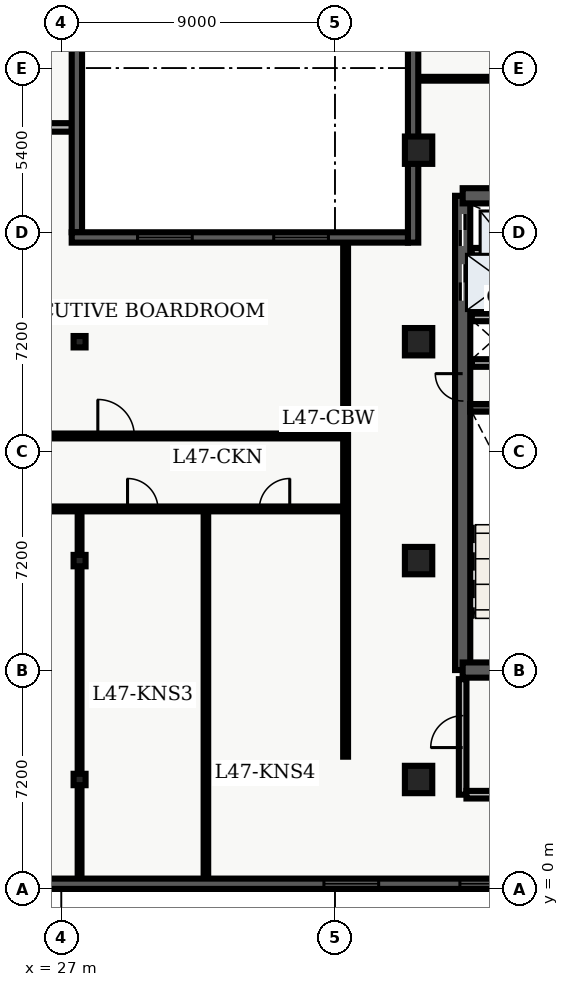
"""IFC4 building model, lengths in metres.
Left out: names, types, materials, properties, quantities, classifications, styles, units other than length and angle.
Written with IfcOpenShell. Run it as: python <this file> out.ifc"""

import sys

from ifc_helpers import new_model, entity, si_unit, converted_unit, direction, frame, origin_with_axes, origin_2d_with_axis, place, context, subcontext, project, spatial, polyline, rectangle, i_section, outline, extrude, element, fill, save


model = new_model("IFC4")
c1 = context("Model", 3, precision=1e-05, world=origin_with_axes(), true_north=direction((0.0, 1.0)))
c2 = subcontext(c1, "Body", "Model", "MODEL_VIEW")
j1 = project(units=[si_unit("LENGTHUNIT", "METRE"), converted_unit("PLANEANGLEUNIT", "DEGREE", entity("IfcPlaneAngleMeasure", 0.017), si_unit("PLANEANGLEUNIT", "RADIAN"), dimensions=[0, 0, 0, 0, 0, 0, 0])], contexts=[c1])
p1 = place(None, origin_with_axes())
s1 = spatial("IfcSite", under=j1, at=p1, CompositionType="ELEMENT")
p2 = place(p1, origin_with_axes())
s2 = spatial("IfcBuilding", under=s1, at=p2, CompositionType="ELEMENT")
p3 = place(p2, frame((0.0, 0.0, 192.6), z_axis=(0.0, 0.0, 1.0), x_axis=(1.0, 0.0, 0.0)))
s3 = spatial("IfcBuildingStorey", under=s2, at=p3, CompositionType="ELEMENT", Elevation=192.6)
p4 = place(p3, frame((40.2, 7.2, 0.0), z_axis=(0.0, 0.0, 1.0), x_axis=(0.0, 1.0, 0.0)))
e1 = element("IfcWall", 1, at=p4, inside=s3, PredefinedType="SHEAR", context=c2, shape_type="SweptSolid", body=[
    extrude(outline(polyline([(0.0, -0.25), (15.6, -0.25), (15.6, 0.25), (0.0, 0.25), (0.0, -0.25)])), origin_with_axes(), (0.0, 0.0, 1.0), 3.66),
])
p5 = place(p4, frame((14.475, 0.0, 0.0), z_axis=(0.0, 0.0, 1.0), x_axis=(1.0, 0.0, 0.0)))
e2 = element("IfcOpeningElement", 2, at=p5, cuts=e1, PredefinedType="OPENING", context=c2, shape_type="SweptSolid", body=[
    extrude(rectangle(XDim=1.05, YDim=0.52, at=origin_2d_with_axis()), origin_with_axes(), (0.0, 0.0, 1.0), 2.15),
])
p6 = place(p4, frame((12.75, 0.0, 0.0), z_axis=(0.0, 0.0, 1.0), x_axis=(1.0, 0.0, 0.0)))
e3 = element("IfcOpeningElement", 3, at=p6, cuts=e1, PredefinedType="OPENING", context=c2, shape_type="SweptSolid", body=[
    extrude(rectangle(XDim=1.2, YDim=0.52, at=origin_2d_with_axis()), origin_with_axes(), (0.0, 0.0, 1.0), 2.15),
])
p7 = place(p4, frame((9.3, 0.0, 0.0), z_axis=(0.0, 0.0, 1.0), x_axis=(1.0, 0.0, 0.0)))
e4 = element("IfcOpeningElement", 4, at=p7, cuts=e1, PredefinedType="OPENING", context=c2, shape_type="SweptSolid", body=[
    extrude(rectangle(XDim=0.9, YDim=0.52, at=origin_2d_with_axis()), origin_with_axes(), (0.0, 0.0, 1.0), 2.15),
])
p8 = place(p3, frame((40.2, 7.2, 0.0), z_axis=(0.0, 0.0, 1.0), x_axis=(1.0, 0.0, 0.0)))
e5 = element("IfcWall", 5, at=p8, inside=s3, PredefinedType="SHEAR", context=c2, shape_type="SweptSolid", body=[
    extrude(outline(polyline([(0.0, -0.25), (7.85, -0.25), (7.85, 0.25), (0.0, 0.25), (0.0, -0.25)])), origin_with_axes(), (0.0, 0.0, 1.0), 3.66),
])
p9 = place(p8, frame((2.175, 0.0, 0.0), z_axis=(0.0, 0.0, 1.0), x_axis=(1.0, 0.0, 0.0)))
e6 = element("IfcOpeningElement", 6, at=p9, cuts=e5, PredefinedType="OPENING", context=c2, shape_type="SweptSolid", body=[
    extrude(rectangle(XDim=1.05, YDim=0.52, at=origin_2d_with_axis()), origin_with_axes(), (0.0, 0.0, 1.0), 2.15),
])
p10 = place(p3, frame((40.2, 22.8, 0.0), z_axis=(0.0, 0.0, 1.0), x_axis=(1.0, 0.0, 0.0)))
e7 = element("IfcWall", 7, at=p10, inside=s3, PredefinedType="SHEAR", context=c2, shape_type="SweptSolid", body=[
    extrude(outline(polyline([(0.0, -0.25), (7.85, -0.25), (7.85, 0.25), (0.0, 0.25), (0.0, -0.25)])), origin_with_axes(), (0.0, 0.0, 1.0), 3.66),
])
p11 = place(p10, frame((5.775, 0.0, 0.0), z_axis=(0.0, 0.0, 1.0), x_axis=(1.0, 0.0, 0.0)))
e8 = element("IfcOpeningElement", 8, at=p11, cuts=e7, PredefinedType="OPENING", context=c2, shape_type="SweptSolid", body=[
    extrude(rectangle(XDim=1.05, YDim=0.52, at=origin_2d_with_axis()), origin_with_axes(), (0.0, 0.0, 1.0), 2.15),
])
p12 = place(p3, frame((40.45, 15.825, 0.0), z_axis=(0.0, 0.0, 1.0), x_axis=(1.0, 0.0, 0.0)))
e9 = element("IfcWall", 9, at=p12, inside=s3, PredefinedType="SHEAR", context=c2, shape_type="SweptSolid", body=[
    extrude(outline(polyline([(0.0, -0.125), (3.55, -0.125), (3.55, 0.125), (0.0, 0.125), (0.0, -0.125)])), origin_with_axes(), (0.0, 0.0, 1.0), 3.66),
])
p13 = place(p3, frame((40.5, 17.3, 0.0), z_axis=(0.0, 0.0, 1.0), x_axis=(1.0, 0.0, 0.0)))
e10 = element("IfcWall", 10, at=p13, inside=s3, PredefinedType="SOLIDWALL", context=c2, shape_type="SweptSolid", body=[
    extrude(outline(polyline([(0.0, -0.125), (3.5, -0.125), (3.5, 0.125), (0.0, 0.125), (0.0, -0.125)])), origin_with_axes(), (0.0, 0.0, 1.0), 2.7),
])
p14 = place(p13, frame((2.4, 0.0, 0.0), z_axis=(0.0, 0.0, 1.0), x_axis=(1.0, 0.0, 0.0)))
e11 = element("IfcOpeningElement", 11, at=p14, cuts=e10, PredefinedType="OPENING", context=c2, shape_type="SweptSolid", body=[
    extrude(rectangle(XDim=0.9, YDim=0.27, at=origin_2d_with_axis()), origin_with_axes(), (0.0, 0.0, 1.0), 2.15),
])
p15 = place(p3, frame((40.5, 18.8, 0.0), z_axis=(0.0, 0.0, 1.0), x_axis=(1.0, 0.0, 0.0)))
e12 = element("IfcWall", 12, at=p15, inside=s3, PredefinedType="SOLIDWALL", context=c2, shape_type="SweptSolid", body=[
    extrude(outline(polyline([(0.0, -0.125), (3.5, -0.125), (3.5, 0.125), (0.0, 0.125), (0.0, -0.125)])), origin_with_axes(), (0.0, 0.0, 1.0), 2.7),
])
p16 = place(p3, frame((40.2, 3.1, 0.0), z_axis=(0.0, 0.0, 1.0), x_axis=(0.0, 1.0, 0.0)))
e13 = element("IfcWall", 13, at=p16, inside=s3, PredefinedType="SOLIDWALL", context=c2, shape_type="SweptSolid", body=[
    extrude(outline(polyline([(0.0, -0.125), (3.8, -0.125), (3.8, 0.125), (0.0, 0.125), (0.0, -0.125)])), origin_with_axes(), (0.0, 0.0, 1.0), 2.7),
])
p17 = place(p16, frame((2.075, 0.0, 0.0), z_axis=(0.0, 0.0, 1.0), x_axis=(1.0, 0.0, 0.0)))
e14 = element("IfcOpeningElement", 14, at=p17, cuts=e13, PredefinedType="OPENING", context=c2, shape_type="SweptSolid", body=[
    extrude(rectangle(XDim=1.05, YDim=0.27, at=origin_2d_with_axis()), origin_with_axes(), (0.0, 0.0, 1.0), 2.15),
])
p18 = place(p3, frame((40.325, 3.1, 0.0), z_axis=(0.0, 0.0, 1.0), x_axis=(1.0, 0.0, 0.0)))
e15 = element("IfcWall", 15, at=p18, inside=s3, PredefinedType="SOLIDWALL", context=c2, shape_type="SweptSolid", body=[
    extrude(outline(polyline([(0.0, -0.125), (3.95, -0.125), (3.95, 0.125), (0.0, 0.125), (0.0, -0.125)])), origin_with_axes(), (0.0, 0.0, 1.0), 2.7),
])
for number, where, z_axis, x_axis in (
    (16, (27.6, 3.6, 0.0), (0.0, 0.0, 1.0), (1.0, 0.0, 0.0)),
    (17, (27.6, 10.8, 0.0), (0.0, 0.0, 1.0), (1.0, 0.0, 0.0)),
    (18, (27.6, 18.0, 0.0), (0.0, 0.0, 1.0), (1.0, 0.0, 0.0)),
):
    element("IfcColumn", number, at=place(p3, frame(where, z_axis=z_axis, x_axis=x_axis)), inside=s3, PredefinedType="COLUMN", context=c2, shape_type="SweptSolid", body=[
        extrude(i_section(OverallWidth=0.394, OverallDepth=0.375, WebThickness=0.017, FlangeThickness=0.028, FilletRadius=0.02, at=origin_2d_with_axis()), origin_with_axes(), (0.0, 0.0, 1.0), 3.9),
    ])
for number, where, z_axis, x_axis in (
    (19, (38.75, 3.6, 0.0), (0.0, 0.0, 1.0), (1.0, 0.0, 0.0)),
    (20, (38.75, 10.8, 0.0), (0.0, 0.0, 1.0), (1.0, 0.0, 0.0)),
    (21, (38.75, 18.0, 0.0), (0.0, 0.0, 1.0), (1.0, 0.0, 0.0)),
    (22, (38.75, 24.3, 0.0), (0.0, 0.0, 1.0), (1.0, 0.0, 0.0)),
):
    element("IfcColumn", number, at=place(p3, frame(where, z_axis=z_axis, x_axis=x_axis)), inside=s3, PredefinedType="COLUMN", context=c2, shape_type="SweptSolid", body=[
        extrude(rectangle(XDim=0.9, YDim=0.9, at=origin_2d_with_axis()), origin_with_axes(), (0.0, 0.0, 1.0), 3.9),
    ])
p19 = place(p3, frame((40.5, 20.96, 0.0), z_axis=(0.0, 0.0, 1.0), x_axis=(1.0, 0.0, 0.0)))
e23 = element("IfcWall", 23, at=p19, inside=s3, PredefinedType="SOLIDWALL", context=c2, shape_type="SweptSolid", body=[
    extrude(outline(polyline([(0.0, -0.125), (3.5, -0.125), (3.5, 0.125), (0.0, 0.125), (0.0, -0.125)])), origin_with_axes(), (0.0, 0.0, 1.0), 2.7),
])
p20 = place(p3, frame((21.3, 25.049, 0.0), z_axis=(0.0, 0.0, 1.0), x_axis=(1.0, 0.0, 0.0)))
e24 = element("IfcWall", 24, at=p20, inside=s3, PredefinedType="PARTITIONING", context=c2, shape_type="SweptSolid", body=[
    extrude(outline(polyline([(0.0, -0.14), (6.046, -0.14), (6.046, 0.14), (0.0, 0.14), (0.0, -0.14)])), origin_with_axes(), (0.0, 0.0, 1.0), 2.7),
])
p21 = place(p3, frame((21.15, 12.5, 0.0), z_axis=(0.0, 0.0, 1.0), x_axis=(1.0, 0.0, 0.0)))
e25 = element("IfcWall", 25, at=p21, inside=s3, PredefinedType="PARTITIONING", context=c2, shape_type="SweptSolid", body=[
    extrude(outline(polyline([(0.0, -0.08), (15.2, -0.08), (15.2, 0.08), (0.0, 0.08), (0.0, -0.08)])), origin_with_axes(), (0.0, 0.0, 1.0), 2.7),
])
p22 = place(p21, frame((1.762, 0.0, 0.0), z_axis=(0.0, 0.0, 1.0), x_axis=(1.0, 0.0, 0.0)))
e26 = element("IfcOpeningElement", 26, at=p22, cuts=e25, PredefinedType="OPENING", context=c2, shape_type="SweptSolid", body=[
    extrude(rectangle(XDim=1.0, YDim=0.18, at=origin_2d_with_axis()), origin_with_axes(), (0.0, 0.0, 1.0), 2.15),
])
p23 = place(p21, frame((4.897, 0.0, 0.0), z_axis=(0.0, 0.0, 1.0), x_axis=(1.0, 0.0, 0.0)))
e27 = element("IfcOpeningElement", 27, at=p23, cuts=e25, PredefinedType="OPENING", context=c2, shape_type="SweptSolid", body=[
    extrude(rectangle(XDim=1.0, YDim=0.18, at=origin_2d_with_axis()), origin_with_axes(), (0.0, 0.0, 1.0), 2.15),
])
p24 = place(p21, frame((8.527, 0.0, 0.0), z_axis=(0.0, 0.0, 1.0), x_axis=(1.0, 0.0, 0.0)))
e28 = element("IfcOpeningElement", 28, at=p24, cuts=e25, PredefinedType="OPENING", context=c2, shape_type="SweptSolid", body=[
    extrude(rectangle(XDim=1.0, YDim=0.18, at=origin_2d_with_axis()), origin_with_axes(), (0.0, 0.0, 1.0), 2.15),
])
p25 = place(p21, frame((12.863, 0.0, 0.0), z_axis=(0.0, 0.0, 1.0), x_axis=(1.0, 0.0, 0.0)))
e29 = element("IfcOpeningElement", 29, at=p25, cuts=e25, PredefinedType="OPENING", context=c2, shape_type="SweptSolid", body=[
    extrude(rectangle(XDim=1.0, YDim=0.18, at=origin_2d_with_axis()), origin_with_axes(), (0.0, 0.0, 1.0), 2.15),
])
p26 = place(p3, frame((21.15, 14.9, 0.0), z_axis=(0.0, 0.0, 1.0), x_axis=(1.0, 0.0, 0.0)))
e30 = element("IfcWall", 30, at=p26, inside=s3, PredefinedType="PARTITIONING", context=c2, shape_type="SweptSolid", body=[
    extrude(outline(polyline([(0.0, -0.08), (15.2, -0.08), (15.2, 0.08), (0.0, 0.08), (0.0, -0.08)])), origin_with_axes(), (0.0, 0.0, 1.0), 2.7),
])
p27 = place(p26, frame((7.65, 0.0, 0.0), z_axis=(0.0, 0.0, 1.0), x_axis=(1.0, 0.0, 0.0)))
e31 = element("IfcOpeningElement", 31, at=p27, cuts=e30, PredefinedType="OPENING", context=c2, shape_type="SweptSolid", body=[
    extrude(rectangle(XDim=1.2, YDim=0.18, at=origin_2d_with_axis()), origin_with_axes(), (0.0, 0.0, 1.0), 2.2),
])
p28 = place(p3, frame((36.35, 4.35, 0.0), z_axis=(0.0, 0.0, 1.0), x_axis=(0.0, 1.0, 0.0)))
e32 = element("IfcWall", 32, at=p28, inside=s3, PredefinedType="PARTITIONING", context=c2, shape_type="SweptSolid", body=[
    extrude(outline(polyline([(0.0, -0.08), (16.95, -0.08), (16.95, 0.08), (0.0, 0.08), (0.0, -0.08)])), origin_with_axes(), (0.0, 0.0, 1.0), 2.7),
])
p29 = place(p3, frame((27.6, 0.335, 0.0), z_axis=(0.0, 0.0, 1.0), x_axis=(0.0, 1.0, 0.0)))
e33 = element("IfcWall", 33, at=p29, inside=s3, PredefinedType="PARTITIONING", context=c2, shape_type="SweptSolid", body=[
    extrude(outline(polyline([(0.0, -0.062), (12.045, -0.062), (12.045, 0.062), (0.0, 0.062), (0.0, -0.062)])), origin_with_axes(), (0.0, 0.0, 1.0), 2.7),
])
p30 = place(p3, frame((31.755, 0.335, 0.0), z_axis=(0.0, 0.0, 1.0), x_axis=(0.0, 1.0, 0.0)))
e34 = element("IfcWall", 34, at=p30, inside=s3, PredefinedType="PARTITIONING", context=c2, shape_type="SweptSolid", body=[
    extrude(outline(polyline([(0.0, -0.075), (12.045, -0.075), (12.045, 0.075), (0.0, 0.075), (0.0, -0.075)])), origin_with_axes(), (0.0, 0.0, 1.0), 2.7),
])
p31 = place(p3, frame((38.735, 26.65, 0.0), z_axis=(0.0, 0.0, 1.0), x_axis=(1.0, 0.0, 0.0)))
e35 = element("IfcWall", 35, at=p31, inside=s3, PredefinedType="PARTITIONING", context=c2, shape_type="SweptSolid", body=[
    extrude(outline(polyline([(0.0, -0.062), (20.905, -0.062), (20.905, 0.062), (0.0, 0.062), (0.0, -0.062)])), origin_with_axes(), (0.0, 0.0, 1.0), 2.7),
])
p32 = place(p31, frame((4.265, 0.0, 0.0), z_axis=(0.0, 0.0, 1.0), x_axis=(1.0, 0.0, 0.0)))
e36 = element("IfcOpeningElement", 36, at=p32, cuts=e35, PredefinedType="OPENING", context=c2, shape_type="SweptSolid", body=[
    extrude(rectangle(XDim=1.0, YDim=0.145, at=origin_2d_with_axis()), origin_with_axes(), (0.0, 0.0, 1.0), 2.15),
])
p33 = place(p3, frame((38.57, 21.26, 0.0), z_axis=(0.0, 0.0, 1.0), x_axis=(0.0, 1.0, 0.0)))
e37 = element("IfcWall", 37, at=p33, inside=s3, PredefinedType="SOLIDWALL", context=c2, shape_type="SweptSolid", body=[
    extrude(outline(polyline([(0.0, -0.17), (7.54, -0.17), (7.54, 0.17), (0.0, 0.17), (0.0, -0.17)])), origin_with_axes(), (0.0, 0.0, 1.0), 3.66),
])
p34 = place(p3, frame((57.26, 0.17, 0.0), z_axis=(0.0, 0.0, 1.0), x_axis=(-1.0, 0.0, 0.0)))
e38 = element("IfcWall", 38, at=p34, inside=s3, PredefinedType="SOLIDWALL", context=c2, shape_type="SweptSolid", body=[
    extrude(outline(polyline([(0.0, -0.17), (54.86, -0.17), (54.86, 0.17), (0.0, 0.17), (0.0, -0.17)])), origin_with_axes(), (0.0, 0.0, 1.0), 3.66),
])
p35 = place(p34, frame((2.836, 0.0, 0.45), z_axis=(0.0, 0.0, 1.0), x_axis=(1.0, 0.0, 0.0)))
e39 = element("IfcOpeningElement", 39, at=p35, cuts=e38, PredefinedType="OPENING", context=c2, shape_type="SweptSolid", body=[
    extrude(rectangle(XDim=1.8, YDim=0.36, at=origin_2d_with_axis()), origin_with_axes(), (0.0, 0.0, 1.0), 2.1),
])
p36 = place(p34, frame((7.307, 0.0, 0.45), z_axis=(0.0, 0.0, 1.0), x_axis=(1.0, 0.0, 0.0)))
e40 = element("IfcOpeningElement", 40, at=p36, cuts=e38, PredefinedType="OPENING", context=c2, shape_type="SweptSolid", body=[
    extrude(rectangle(XDim=1.8, YDim=0.36, at=origin_2d_with_axis()), origin_with_axes(), (0.0, 0.0, 1.0), 2.1),
])
p37 = place(p34, frame((11.779, 0.0, 0.45), z_axis=(0.0, 0.0, 1.0), x_axis=(1.0, 0.0, 0.0)))
e41 = element("IfcOpeningElement", 41, at=p37, cuts=e38, PredefinedType="OPENING", context=c2, shape_type="SweptSolid", body=[
    extrude(rectangle(XDim=1.8, YDim=0.36, at=origin_2d_with_axis()), origin_with_axes(), (0.0, 0.0, 1.0), 2.1),
])
p38 = place(p34, frame((16.251, 0.0, 0.45), z_axis=(0.0, 0.0, 1.0), x_axis=(1.0, 0.0, 0.0)))
e42 = element("IfcOpeningElement", 42, at=p38, cuts=e38, PredefinedType="OPENING", context=c2, shape_type="SweptSolid", body=[
    extrude(rectangle(XDim=1.8, YDim=0.36, at=origin_2d_with_axis()), origin_with_axes(), (0.0, 0.0, 1.0), 2.1),
])
p39 = place(p34, frame((20.723, 0.0, 0.45), z_axis=(0.0, 0.0, 1.0), x_axis=(1.0, 0.0, 0.0)))
e43 = element("IfcOpeningElement", 43, at=p39, cuts=e38, PredefinedType="OPENING", context=c2, shape_type="SweptSolid", body=[
    extrude(rectangle(XDim=1.8, YDim=0.36, at=origin_2d_with_axis()), origin_with_axes(), (0.0, 0.0, 1.0), 2.1),
])
p40 = place(p34, frame((34.588, 0.0, 0.45), z_axis=(0.0, 0.0, 1.0), x_axis=(1.0, 0.0, 0.0)))
e44 = element("IfcOpeningElement", 44, at=p40, cuts=e38, PredefinedType="OPENING", context=c2, shape_type="SweptSolid", body=[
    extrude(rectangle(XDim=1.8, YDim=0.36, at=origin_2d_with_axis()), origin_with_axes(), (0.0, 0.0, 1.0), 2.1),
])
p41 = place(p34, frame((38.609, 0.0, 0.45), z_axis=(0.0, 0.0, 1.0), x_axis=(1.0, 0.0, 0.0)))
e45 = element("IfcOpeningElement", 45, at=p41, cuts=e38, PredefinedType="OPENING", context=c2, shape_type="SweptSolid", body=[
    extrude(rectangle(XDim=1.8, YDim=0.36, at=origin_2d_with_axis()), origin_with_axes(), (0.0, 0.0, 1.0), 2.1),
])
p42 = place(p34, frame((43.081, 0.0, 0.45), z_axis=(0.0, 0.0, 1.0), x_axis=(1.0, 0.0, 0.0)))
e46 = element("IfcOpeningElement", 46, at=p42, cuts=e38, PredefinedType="OPENING", context=c2, shape_type="SweptSolid", body=[
    extrude(rectangle(XDim=1.8, YDim=0.36, at=origin_2d_with_axis()), origin_with_axes(), (0.0, 0.0, 1.0), 2.1),
])
p43 = place(p34, frame((48.003, 0.0, 0.45), z_axis=(0.0, 0.0, 1.0), x_axis=(1.0, 0.0, 0.0)))
e47 = element("IfcOpeningElement", 47, at=p43, cuts=e38, PredefinedType="OPENING", context=c2, shape_type="SweptSolid", body=[
    extrude(rectangle(XDim=1.8, YDim=0.36, at=origin_2d_with_axis()), origin_with_axes(), (0.0, 0.0, 1.0), 2.1),
])
p44 = place(p34, frame((52.024, 0.0, 0.45), z_axis=(0.0, 0.0, 1.0), x_axis=(1.0, 0.0, 0.0)))
e48 = element("IfcOpeningElement", 48, at=p44, cuts=e38, PredefinedType="OPENING", context=c2, shape_type="SweptSolid", body=[
    extrude(rectangle(XDim=1.8, YDim=0.36, at=origin_2d_with_axis()), origin_with_axes(), (0.0, 0.0, 1.0), 2.1),
])
p45 = place(p3, frame((27.511, 42.42, 0.0), z_axis=(0.0, 0.0, 1.0), x_axis=(0.0, -1.0, 0.0)))
e49 = element("IfcWall", 49, at=p45, inside=s3, PredefinedType="SOLIDWALL", context=c2, shape_type="SweptSolid", body=[
    extrude(outline(polyline([(0.0, -0.17), (20.82, -0.17), (20.82, 0.17), (0.0, 0.17), (0.0, -0.17)])), origin_with_axes(), (0.0, 0.0, 1.0), 3.66),
])
p46 = place(p45, frame((3.503, 0.0, 0.45), z_axis=(0.0, 0.0, 1.0), x_axis=(1.0, 0.0, 0.0)))
e50 = element("IfcOpeningElement", 50, at=p46, cuts=e49, PredefinedType="OPENING", context=c2, shape_type="SweptSolid", body=[
    extrude(rectangle(XDim=1.6, YDim=0.36, at=origin_2d_with_axis()), origin_with_axes(), (0.0, 0.0, 1.0), 2.2),
])
p47 = place(p45, frame((7.957, 0.0, 0.45), z_axis=(0.0, 0.0, 1.0), x_axis=(1.0, 0.0, 0.0)))
e51 = element("IfcOpeningElement", 51, at=p47, cuts=e49, PredefinedType="OPENING", context=c2, shape_type="SweptSolid", body=[
    extrude(rectangle(XDim=1.6, YDim=0.36, at=origin_2d_with_axis()), origin_with_axes(), (0.0, 0.0, 1.0), 2.2),
])
p48 = place(p45, frame((12.412, 0.0, 0.45), z_axis=(0.0, 0.0, 1.0), x_axis=(1.0, 0.0, 0.0)))
e52 = element("IfcOpeningElement", 52, at=p48, cuts=e49, PredefinedType="OPENING", context=c2, shape_type="SweptSolid", body=[
    extrude(rectangle(XDim=1.6, YDim=0.36, at=origin_2d_with_axis()), origin_with_axes(), (0.0, 0.0, 1.0), 2.2),
])
p49 = place(p3, frame((27.341, 21.43, 0.0), z_axis=(0.0, 0.0, 1.0), x_axis=(1.0, 0.0, 0.0)))
e53 = element("IfcWall", 53, at=p49, inside=s3, PredefinedType="SOLIDWALL", context=c2, shape_type="SweptSolid", body=[
    extrude(outline(polyline([(0.0, -0.17), (11.059, -0.17), (11.059, 0.17), (0.0, 0.17), (0.0, -0.17)])), origin_with_axes(), (0.0, 0.0, 1.0), 3.66),
])
p50 = place(p49, frame((3.065, 0.0, 0.45), z_axis=(0.0, 0.0, 1.0), x_axis=(1.0, 0.0, 0.0)))
e54 = element("IfcOpeningElement", 54, at=p50, cuts=e53, PredefinedType="OPENING", context=c2, shape_type="SweptSolid", body=[
    extrude(rectangle(XDim=1.8, YDim=0.36, at=origin_2d_with_axis()), origin_with_axes(), (0.0, 0.0, 1.0), 2.1),
])
p51 = place(p49, frame((7.544, 0.0, 0.45), z_axis=(0.0, 0.0, 1.0), x_axis=(1.0, 0.0, 0.0)))
e55 = element("IfcOpeningElement", 55, at=p51, cuts=e53, PredefinedType="OPENING", context=c2, shape_type="SweptSolid", body=[
    extrude(rectangle(XDim=1.8, YDim=0.36, at=origin_2d_with_axis()), origin_with_axes(), (0.0, 0.0, 1.0), 2.1),
])
p52 = place(p4, frame((14.475, 0.0, 0.0), z_axis=(0.0, 0.0, 1.0), x_axis=(1.0, 0.0, 0.0)))
e56 = element("IfcDoor", 56, at=p52, inside=s3, OperationType="SLIDING_TO_RIGHT", PredefinedType="DOOR", context=c2, shape_type="SweptSolid", body=[
    extrude(rectangle(XDim=1.05, YDim=0.09, at=origin_2d_with_axis()), origin_with_axes(), (0.0, 0.0, 1.0), 2.15),
])
fill(e2, e56)
p53 = place(p4, frame((12.75, 0.0, 0.0), z_axis=(0.0, 0.0, 1.0), x_axis=(1.0, 0.0, 0.0)))
e57 = element("IfcDoor", 57, at=p53, inside=s3, OperationType="DOUBLE_DOOR_SLIDING", PredefinedType="DOOR", context=c2, shape_type="SweptSolid", body=[
    extrude(rectangle(XDim=1.2, YDim=0.09, at=origin_2d_with_axis()), origin_with_axes(), (0.0, 0.0, 1.0), 2.15),
])
fill(e3, e57)
p54 = place(p4, frame((9.3, 0.0, 0.0), z_axis=(0.0, 0.0, 1.0), x_axis=(1.0, 0.0, 0.0)))
e58 = element("IfcDoor", 58, at=p54, inside=s3, OperationType="SINGLE_SWING_RIGHT", PredefinedType="DOOR", context=c2, shape_type="SweptSolid", body=[
    extrude(rectangle(XDim=0.9, YDim=0.09, at=origin_2d_with_axis()), origin_with_axes(), (0.0, 0.0, 1.0), 2.15),
])
fill(e4, e58)
p55 = place(p16, frame((2.075, 0.0, 0.0), z_axis=(0.0, 0.0, 1.0), x_axis=(1.0, 0.0, 0.0)))
e59 = element("IfcDoor", 59, at=p55, inside=s3, OperationType="SINGLE_SWING_LEFT", PredefinedType="DOOR", context=c2, shape_type="SweptSolid", body=[
    extrude(rectangle(XDim=1.05, YDim=0.09, at=origin_2d_with_axis()), origin_with_axes(), (0.0, 0.0, 1.0), 2.15),
])
fill(e14, e59)
p56 = place(p21, frame((8.527, 0.0, 0.0), z_axis=(0.0, 0.0, 1.0), x_axis=(1.0, 0.0, 0.0)))
e60 = element("IfcDoor", 60, at=p56, inside=s3, OperationType="SINGLE_SWING_LEFT", PredefinedType="DOOR", context=c2, shape_type="SweptSolid", body=[
    extrude(rectangle(XDim=1.0, YDim=0.09, at=origin_2d_with_axis()), origin_with_axes(), (0.0, 0.0, 1.0), 2.15),
])
fill(e28, e60)
p57 = place(p21, frame((12.863, 0.0, 0.0), z_axis=(0.0, 0.0, 1.0), x_axis=(1.0, 0.0, 0.0)))
e61 = element("IfcDoor", 61, at=p57, inside=s3, OperationType="SINGLE_SWING_RIGHT", PredefinedType="DOOR", context=c2, shape_type="SweptSolid", body=[
    extrude(rectangle(XDim=1.0, YDim=0.09, at=origin_2d_with_axis()), origin_with_axes(), (0.0, 0.0, 1.0), 2.15),
])
fill(e29, e61)
p58 = place(p26, frame((7.65, 0.0, 0.0), z_axis=(0.0, 0.0, 1.0), x_axis=(1.0, 0.0, 0.0)))
e62 = element("IfcDoor", 62, at=p58, inside=s3, OperationType="SINGLE_SWING_LEFT", PredefinedType="DOOR", context=c2, shape_type="SweptSolid", body=[
    extrude(rectangle(XDim=1.2, YDim=0.09, at=origin_2d_with_axis()), origin_with_axes(), (0.0, 0.0, 1.0), 2.2),
])
fill(e31, e62)
p59 = place(p34, frame((16.251, 0.0, 0.45), z_axis=(0.0, 0.0, 1.0), x_axis=(1.0, 0.0, 0.0)))
e63 = element("IfcWindow", 63, at=p59, inside=s3, PredefinedType="WINDOW", context=c2, shape_type="SweptSolid", body=[
    extrude(rectangle(XDim=1.8, YDim=0.09, at=origin_2d_with_axis()), origin_with_axes(), (0.0, 0.0, 1.0), 2.1),
])
fill(e42, e63)
p60 = place(p34, frame((20.723, 0.0, 0.45), z_axis=(0.0, 0.0, 1.0), x_axis=(1.0, 0.0, 0.0)))
e64 = element("IfcWindow", 64, at=p60, inside=s3, PredefinedType="WINDOW", context=c2, shape_type="SweptSolid", body=[
    extrude(rectangle(XDim=1.8, YDim=0.09, at=origin_2d_with_axis()), origin_with_axes(), (0.0, 0.0, 1.0), 2.1),
])
fill(e43, e64)
p61 = place(p49, frame((3.065, 0.0, 0.45), z_axis=(0.0, 0.0, 1.0), x_axis=(1.0, 0.0, 0.0)))
e65 = element("IfcWindow", 65, at=p61, inside=s3, PredefinedType="WINDOW", context=c2, shape_type="SweptSolid", body=[
    extrude(rectangle(XDim=1.8, YDim=0.09, at=origin_2d_with_axis()), origin_with_axes(), (0.0, 0.0, 1.0), 2.1),
])
fill(e54, e65)
p62 = place(p49, frame((7.544, 0.0, 0.45), z_axis=(0.0, 0.0, 1.0), x_axis=(1.0, 0.0, 0.0)))
e66 = element("IfcWindow", 66, at=p62, inside=s3, PredefinedType="WINDOW", context=c2, shape_type="SweptSolid", body=[
    extrude(rectangle(XDim=1.8, YDim=0.09, at=origin_2d_with_axis()), origin_with_axes(), (0.0, 0.0, 1.0), 2.1),
])
fill(e55, e66)
save(model, sys.argv[1])
